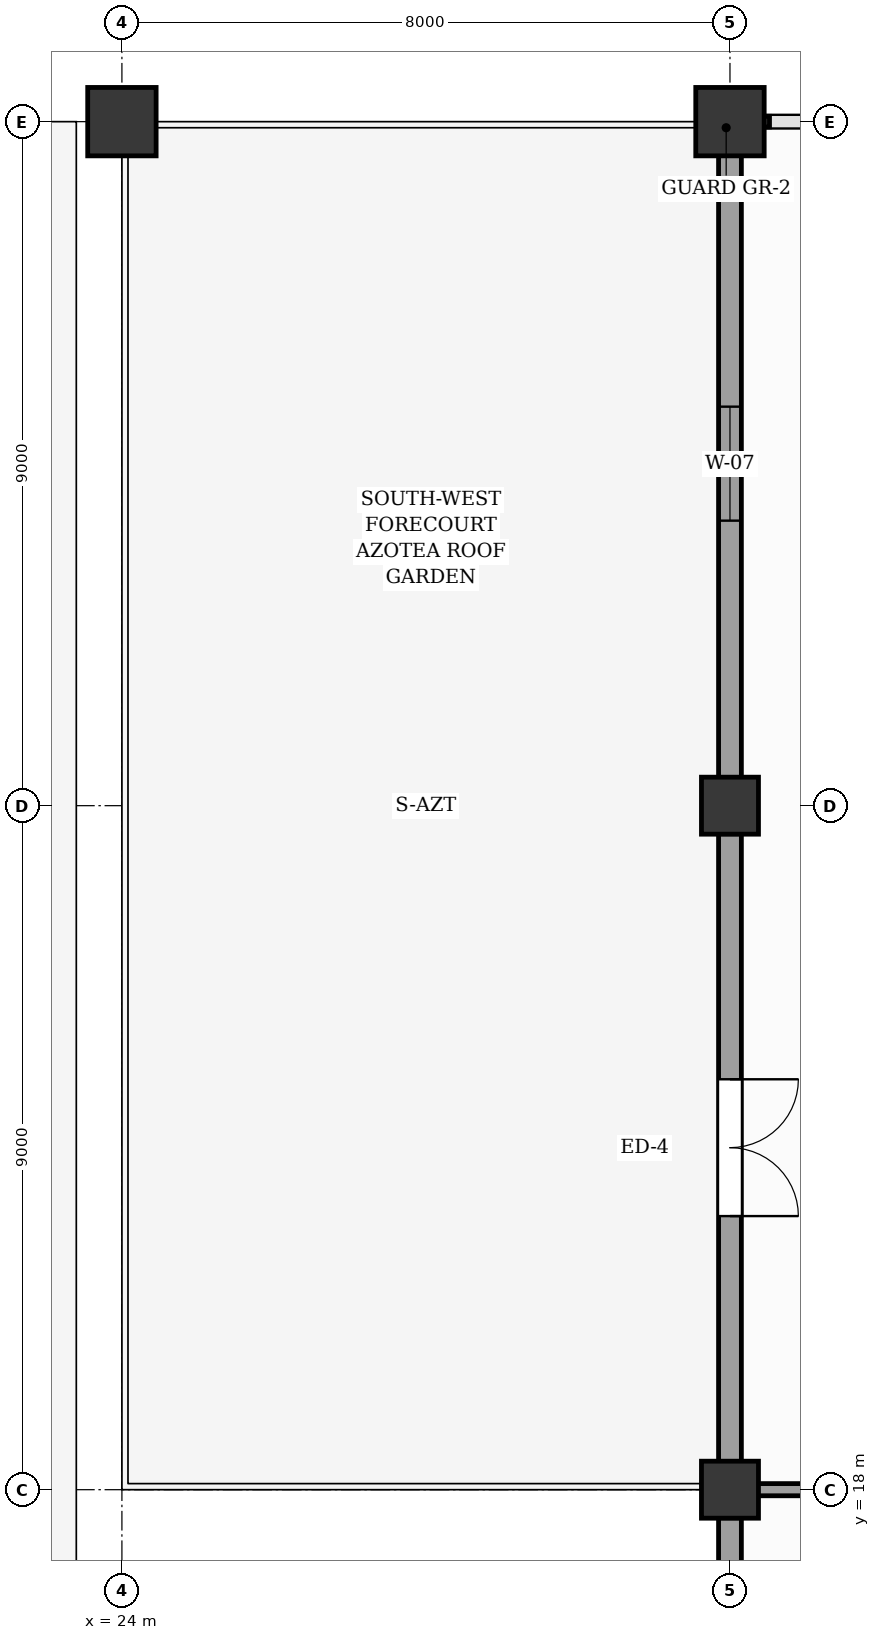
"""IFC4 building model, lengths in metres.
Left out: names, types, materials, properties, quantities, classifications, styles, units other than length and angle.
Written with IfcOpenShell. Run it as: python <this file> out.ifc"""

import sys

from ifc_helpers import new_model, si_unit, direction, frame, frame_2d, origin, origin_2d, place, context, subcontext, project, spatial, rectangle, extrude, element, fill, save


model = new_model("IFC4")
c1 = context("Model", 3, precision=1e-05, world=origin(), true_north=direction((0.0, 1.0)))
c2 = subcontext(c1, "Body", "Model", "MODEL_VIEW")
j1 = project(units=[si_unit("LENGTHUNIT", "METRE"), si_unit("PLANEANGLEUNIT", "RADIAN")], contexts=[c1])
p1 = place(None, origin())
s1 = spatial("IfcSite", under=j1, at=p1, CompositionType="ELEMENT")
p2 = place(p1, origin())
s2 = spatial("IfcBuilding", under=s1, at=p2, CompositionType="ELEMENT")
p3 = place(p2, frame((0.0, 0.0, 9.6)))
s3 = spatial("IfcBuildingStorey", under=s2, at=p3, CompositionType="ELEMENT", Elevation=9.6)
for number, where, z_axis, x_axis in (
    (1, (32.0, 18.0, 0.0), (0.0, 0.0, 1.0), (1.0, 0.0, 0.0)),
    (2, (32.0, 27.0, 0.0), (0.0, 0.0, 1.0), (1.0, 0.0, 0.0)),
):
    element("IfcColumn", number, at=place(p3, frame(where, z_axis=z_axis, x_axis=x_axis)), inside=s3, PredefinedType="COLUMN", context=c2, shape_type="SweptSolid", body=[
        extrude(rectangle(XDim=0.75, YDim=0.75, at=origin_2d()), origin(), (0.0, 0.0, 1.0), 6.6),
    ])
p4 = place(p3, frame((32.0, 36.0, 0.0), z_axis=(0.0, 0.0, 1.0), x_axis=(1.0, 0.0, 0.0)))
e3 = element("IfcColumn", 3, at=p4, inside=s3, PredefinedType="COLUMN", context=c2, shape_type="SweptSolid", body=[
    extrude(rectangle(XDim=0.9, YDim=0.9, at=origin_2d()), origin(), (0.0, 0.0, 1.0), 6.6),
])
p5 = place(p3, frame((24.0, 36.0, 0.0), z_axis=(0.0, 0.0, 1.0), x_axis=(1.0, 0.0, 0.0)))
e4 = element("IfcColumn", 4, at=p5, inside=s3, PredefinedType="COLUMN", context=c2, shape_type="SweptSolid", body=[
    extrude(rectangle(XDim=0.9, YDim=0.9, at=origin_2d()), origin(), (0.0, 0.0, 1.0), 3.0),
])
p6 = place(p3, frame((32.0, 9.37, 0.0), z_axis=(0.0, 0.0, 1.0), x_axis=(0.0, 1.0, 0.0)))
e5 = element("IfcWall", 5, at=p6, inside=s3, PredefinedType="SOLIDWALL", context=c2, shape_type="SweptSolid", body=[
    extrude(rectangle(XDim=8.26, YDim=0.3, at=frame_2d((4.13, 0.0))), origin(), (0.0, 0.0, 1.0), 5.51),
])
p7 = place(p6, frame((3.38, 0.0, 0.95)))
e6 = element("IfcOpeningElement", 6, at=p7, cuts=e5, PredefinedType="OPENING", context=c2, shape_type="SweptSolid", body=[
    extrude(rectangle(XDim=1.5, YDim=1.9, at=frame_2d((0.75, 0.95))), frame((0.0, 0.16, 0.0), z_axis=(0.0, -1.0, 0.0), x_axis=(1.0, 0.0, 0.0)), (0.0, 0.0, 1.0), 0.32),
])
p8 = place(p3, frame((32.0, 18.37, 0.0), z_axis=(0.0, 0.0, 1.0), x_axis=(0.0, 1.0, 0.0)))
e7 = element("IfcWall", 7, at=p8, inside=s3, PredefinedType="SOLIDWALL", context=c2, shape_type="SweptSolid", body=[
    extrude(rectangle(XDim=8.26, YDim=0.3, at=frame_2d((4.13, 0.0))), origin(), (0.0, 0.0, 1.0), 5.51),
])
p9 = place(p8, frame((3.23, 0.0, 0.0)))
e8 = element("IfcOpeningElement", 8, at=p9, cuts=e7, PredefinedType="OPENING", context=c2, shape_type="SweptSolid", body=[
    extrude(rectangle(XDim=1.8, YDim=2.2, at=frame_2d((0.9, 1.1))), frame((0.0, 0.16, 0.0), z_axis=(0.0, -1.0, 0.0), x_axis=(1.0, 0.0, 0.0)), (0.0, 0.0, 1.0), 0.32),
])
p10 = place(p3, frame((32.0, 27.37, 0.0), z_axis=(0.0, 0.0, 1.0), x_axis=(0.0, 1.0, 0.0)))
e9 = element("IfcWall", 9, at=p10, inside=s3, PredefinedType="SOLIDWALL", context=c2, shape_type="SweptSolid", body=[
    extrude(rectangle(XDim=8.23, YDim=0.3, at=frame_2d((4.115, 0.0))), origin(), (0.0, 0.0, 1.0), 5.36),
])
p11 = place(p10, frame((3.38, 0.0, 0.95)))
e10 = element("IfcOpeningElement", 10, at=p11, cuts=e9, PredefinedType="OPENING", context=c2, shape_type="SweptSolid", body=[
    extrude(rectangle(XDim=1.5, YDim=1.9, at=frame_2d((0.75, 0.95))), frame((0.0, 0.16, 0.0), z_axis=(0.0, -1.0, 0.0), x_axis=(1.0, 0.0, 0.0)), (0.0, 0.0, 1.0), 0.32),
])
p12 = place(p3, frame((32.3, 18.0, 0.0), z_axis=(0.0, 0.0, 1.0), x_axis=(1.0, 0.0, 0.0)))
e11 = element("IfcWall", 11, at=p12, inside=s3, PredefinedType="PARTITIONING", context=c2, shape_type="SweptSolid", body=[
    extrude(rectangle(XDim=7.4, YDim=0.16, at=frame_2d((3.7, 0.0))), origin(), (0.0, 0.0, 1.0), 5.5),
])
p13 = place(p12, frame((2.8, 0.0, 0.0)))
e12 = element("IfcOpeningElement", 12, at=p13, cuts=e11, PredefinedType="OPENING", context=c2, shape_type="SweptSolid", body=[
    extrude(rectangle(XDim=1.8, YDim=2.25, at=frame_2d((0.9, 1.125))), frame((0.0, 0.09, 0.0), z_axis=(0.0, -1.0, 0.0), x_axis=(1.0, 0.0, 0.0)), (0.0, 0.0, 1.0), 0.18),
])
p14 = place(p9, frame((1.8, 0.0, 0.0), z_axis=(0.0, 0.0, 1.0), x_axis=(-1.0, 0.0, 0.0)))
e13 = element("IfcDoor", 13, at=p14, inside=s3, OperationType="DOUBLE_DOOR_SINGLE_SWING", PredefinedType="DOOR", context=c2, shape_type="SweptSolid", body=[
    extrude(rectangle(XDim=1.8, YDim=2.2, at=frame_2d((0.9, 1.1))), frame((0.0, 0.025, 0.0), z_axis=(0.0, -1.0, 0.0), x_axis=(1.0, 0.0, 0.0)), (0.0, 0.0, 1.0), 0.05),
])
fill(e8, e13)
p15 = place(p11, origin())
e14 = element("IfcWindow", 14, at=p15, inside=s3, PartitioningType="SINGLE_PANEL", PredefinedType="WINDOW", context=c2, shape_type="SweptSolid", body=[
    extrude(rectangle(XDim=1.5, YDim=1.9, at=frame_2d((0.75, 0.95))), frame((0.0, 0.03, 0.0), z_axis=(0.0, -1.0, 0.0), x_axis=(1.0, 0.0, 0.0)), (0.0, 0.0, 1.0), 0.06),
])
fill(e10, e14)
save(model, sys.argv[1])
